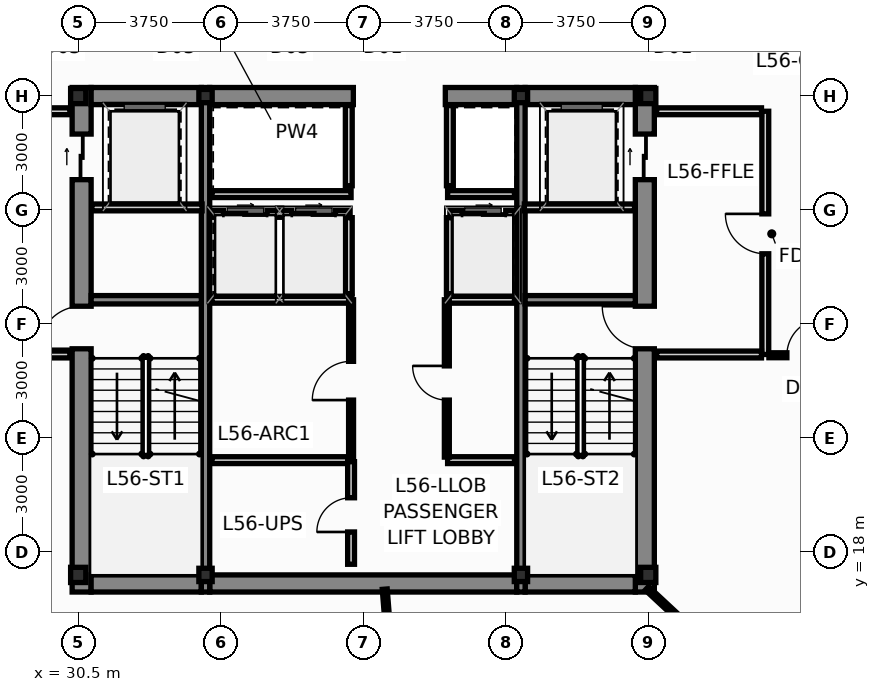
"""IFC4 building model, lengths in metres.
Left out: names, types, materials, properties, quantities, classifications, styles, units other than length and angle.
Written with IfcOpenShell. Run it as: python <this file> out.ifc"""

import sys

from ifc_helpers import new_model, si_unit, direction, frame, frame_2d, origin, origin_2d, place, context, subcontext, project, spatial, rectangle, hollow_rectangle, i_section, extrude, source, transform, mapped, element, fill, save


model = new_model("IFC4")
c1 = context("Model", 3, precision=1e-05, world=origin(), true_north=direction((0.0, 1.0)))
c2 = subcontext(c1, "Body", "Model", "MODEL_VIEW")
j1 = project(units=[si_unit("LENGTHUNIT", "METRE"), si_unit("PLANEANGLEUNIT", "RADIAN")], contexts=[c1])
p1 = place(None, origin())
s1 = spatial("IfcSite", under=j1, at=p1, CompositionType="ELEMENT")
p2 = place(p1, origin())
s2 = spatial("IfcBuilding", under=s1, at=p2, CompositionType="ELEMENT")
p3 = place(p2, frame((0.0, 0.0, 213.25)))
s3 = spatial("IfcBuildingStorey", under=s2, at=p3, CompositionType="ELEMENT", Elevation=213.25)
m1 = source(origin(), c2, "Body", "SweptSolid", [
    extrude(i_section(OverallWidth=0.4, OverallDepth=0.4, WebThickness=0.02, FlangeThickness=0.032, at=origin_2d()), origin(), (0.0, 0.0, 1.0), 3.65),
])
for number, where, z_axis, x_axis in (
    (1, (30.5, 17.4, 0.0), (0.0, 0.0, 1.0), (1.0, 0.0, 0.0)),
    (2, (45.5, 17.4, 0.0), (0.0, 0.0, 1.0), (1.0, 0.0, 0.0)),
    (3, (45.5, 30.0, 0.0), (0.0, 0.0, 1.0), (1.0, 0.0, 0.0)),
    (4, (30.5, 30.0, 0.0), (0.0, 0.0, 1.0), (1.0, 0.0, 0.0)),
):
    element("IfcColumn", number, at=place(p3, frame(where, z_axis=z_axis, x_axis=x_axis)), inside=s3, PredefinedType="COLUMN", context=c2, shape_type="MappedRepresentation", body=[
        mapped(m1, transform((0.0, 0.0, 0.0), scale=1.0)),
    ])
m2 = source(origin(), c2, "Body", "SweptSolid", [
    extrude(hollow_rectangle(XDim=0.35, YDim=0.35, WallThickness=0.016, at=origin_2d()), origin(), (0.0, 0.0, 1.0), 3.65),
])
for number, where, z_axis, x_axis in (
    (5, (33.85, 17.4, 0.0), (0.0, 0.0, 1.0), (1.0, 0.0, 0.0)),
    (6, (42.15, 17.4, 0.0), (0.0, 0.0, 1.0), (1.0, 0.0, 0.0)),
    (7, (33.85, 30.0, 0.0), (0.0, 0.0, 1.0), (1.0, 0.0, 0.0)),
    (8, (42.15, 30.0, 0.0), (0.0, 0.0, 1.0), (1.0, 0.0, 0.0)),
):
    element("IfcColumn", number, at=place(p3, frame(where, z_axis=z_axis, x_axis=x_axis)), inside=s3, PredefinedType="COLUMN", context=c2, shape_type="MappedRepresentation", body=[
        mapped(m2, transform((0.0, 0.0, 0.0), scale=1.0)),
    ])
p4 = place(p3, frame((30.59, 16.95, 0.0), z_axis=(0.0, 0.0, 1.0), x_axis=(0.0, 1.0, 0.0)))
e9 = element("IfcWall", 9, at=p4, inside=s3, PredefinedType="SHEAR", context=c2, shape_type="SweptSolid", body=[
    extrude(rectangle(XDim=13.275, YDim=0.5, at=frame_2d((6.638, 0.0))), origin(), (0.0, 0.0, 1.0), 3.65),
])
p5 = place(p4, frame((6.4, 0.0, 0.0)))
e10 = element("IfcOpeningElement", 10, at=p5, cuts=e9, PredefinedType="OPENING", context=c2, shape_type="SweptSolid", body=[
    extrude(rectangle(XDim=1.12, YDim=2.15, at=frame_2d((0.56, 1.075))), frame((0.0, 0.262, 0.0), z_axis=(0.0, -1.0, 0.0), x_axis=(1.0, 0.0, 0.0)), (0.0, 0.0, 1.0), 0.524),
])
p6 = place(p4, frame((10.85, 0.0, 0.0)))
e11 = element("IfcOpeningElement", 11, at=p6, cuts=e9, PredefinedType="OPENING", context=c2, shape_type="SweptSolid", body=[
    extrude(rectangle(XDim=1.2, YDim=2.2, at=frame_2d((0.6, 1.1))), frame((0.0, 0.262, 0.0), z_axis=(0.0, -1.0, 0.0), x_axis=(1.0, 0.0, 0.0)), (0.0, 0.0, 1.0), 0.524),
])
p7 = place(p3, frame((45.41, 16.95, 0.0), z_axis=(0.0, 0.0, 1.0), x_axis=(0.0, 1.0, 0.0)))
e12 = element("IfcWall", 12, at=p7, inside=s3, PredefinedType="SHEAR", context=c2, shape_type="SweptSolid", body=[
    extrude(rectangle(XDim=13.275, YDim=0.5, at=frame_2d((6.638, 0.0))), origin(), (0.0, 0.0, 1.0), 3.65),
])
p8 = place(p7, frame((6.4, 0.0, 0.0)))
e13 = element("IfcOpeningElement", 13, at=p8, cuts=e12, PredefinedType="OPENING", context=c2, shape_type="SweptSolid", body=[
    extrude(rectangle(XDim=1.12, YDim=2.15, at=frame_2d((0.56, 1.075))), frame((0.0, 0.262, 0.0), z_axis=(0.0, -1.0, 0.0), x_axis=(1.0, 0.0, 0.0)), (0.0, 0.0, 1.0), 0.524),
])
p9 = place(p7, frame((10.85, 0.0, 0.0)))
e14 = element("IfcOpeningElement", 14, at=p9, cuts=e12, PredefinedType="OPENING", context=c2, shape_type="SweptSolid", body=[
    extrude(rectangle(XDim=1.2, YDim=2.2, at=frame_2d((0.6, 1.1))), frame((0.0, 0.262, 0.0), z_axis=(0.0, -1.0, 0.0), x_axis=(1.0, 0.0, 0.0)), (0.0, 0.0, 1.0), 0.524),
])
p10 = place(p3, frame((30.84, 17.175, 0.0), z_axis=(0.0, 0.0, 1.0), x_axis=(1.0, 0.0, 0.0)))
e15 = element("IfcWall", 15, at=p10, inside=s3, PredefinedType="SHEAR", context=c2, shape_type="SweptSolid", body=[
    extrude(rectangle(XDim=2.9, YDim=0.45, at=frame_2d((1.45, 0.0))), origin(), (0.0, 0.0, 1.0), 3.65),
])
p11 = place(p3, frame((33.96, 17.175, 0.0), z_axis=(0.0, 0.0, 1.0), x_axis=(1.0, 0.0, 0.0)))
e16 = element("IfcWall", 16, at=p11, inside=s3, PredefinedType="SHEAR", context=c2, shape_type="SweptSolid", body=[
    extrude(rectangle(XDim=8.08, YDim=0.45, at=frame_2d((4.04, 0.0))), origin(), (0.0, 0.0, 1.0), 3.65),
])
for number, where, z_axis, x_axis in (
    (17, (42.26, 17.175, 0.0), (0.0, 0.0, 1.0), (1.0, 0.0, 0.0)),
    (18, (30.84, 30.0, 0.0), (0.0, 0.0, 1.0), (1.0, 0.0, 0.0)),
):
    element("IfcWall", number, at=place(p3, frame(where, z_axis=z_axis, x_axis=x_axis)), inside=s3, PredefinedType="SHEAR", context=c2, shape_type="SweptSolid", body=[
        extrude(rectangle(XDim=2.9, YDim=0.45, at=frame_2d((1.45, 0.0))), origin(), (0.0, 0.0, 1.0), 3.65),
    ])
p12 = place(p3, frame((33.96, 30.0, 0.0), z_axis=(0.0, 0.0, 1.0), x_axis=(1.0, 0.0, 0.0)))
e19 = element("IfcWall", 19, at=p12, inside=s3, PredefinedType="SHEAR", context=c2, shape_type="SweptSolid", body=[
    extrude(rectangle(XDim=3.78, YDim=0.45, at=frame_2d((1.89, 0.0))), origin(), (0.0, 0.0, 1.0), 3.65),
])
p13 = place(p3, frame((40.16, 30.0, 0.0), z_axis=(0.0, 0.0, 1.0), x_axis=(1.0, 0.0, 0.0)))
e20 = element("IfcWall", 20, at=p13, inside=s3, PredefinedType="SHEAR", context=c2, shape_type="SweptSolid", body=[
    extrude(rectangle(XDim=1.88, YDim=0.45, at=frame_2d((0.94, 0.0))), origin(), (0.0, 0.0, 1.0), 3.65),
])
p14 = place(p3, frame((42.26, 30.0, 0.0), z_axis=(0.0, 0.0, 1.0), x_axis=(1.0, 0.0, 0.0)))
e21 = element("IfcWall", 21, at=p14, inside=s3, PredefinedType="SHEAR", context=c2, shape_type="SweptSolid", body=[
    extrude(rectangle(XDim=2.9, YDim=0.45, at=frame_2d((1.45, 0.0))), origin(), (0.0, 0.0, 1.0), 3.65),
])
for number, where, z_axis, x_axis in (
    (22, (33.85, 16.95, 0.0), (0.0, 0.0, 1.0), (0.0, 1.0, 0.0)),
    (23, (42.15, 16.95, 0.0), (0.0, 0.0, 1.0), (0.0, 1.0, 0.0)),
):
    element("IfcWall", number, at=place(p3, frame(where, z_axis=z_axis, x_axis=x_axis)), inside=s3, PredefinedType="SHEAR", context=c2, shape_type="SweptSolid", body=[
        extrude(rectangle(XDim=13.275, YDim=0.22, at=frame_2d((6.638, 0.0))), origin(), (0.0, 0.0, 1.0), 3.65),
    ])
for number, where, z_axis, x_axis in (
    (24, (30.84, 24.64, 0.0), (0.0, 0.0, 1.0), (1.0, 0.0, 0.0)),
    (25, (42.26, 24.64, 0.0), (0.0, 0.0, 1.0), (1.0, 0.0, 0.0)),
):
    element("IfcWall", number, at=place(p3, frame(where, z_axis=z_axis, x_axis=x_axis)), inside=s3, PredefinedType="SHEAR", context=c2, shape_type="SweptSolid", body=[
        extrude(rectangle(XDim=2.9, YDim=0.22, at=frame_2d((1.45, 0.0))), origin(), (0.0, 0.0, 1.0), 3.65),
    ])
p15 = place(p3, frame((34.02, 26.9, 0.0), z_axis=(0.0, 0.0, 1.0), x_axis=(1.0, 0.0, 0.0)))
e26 = element("IfcWall", 26, at=p15, inside=s3, PredefinedType="PARTITIONING", context=c2, shape_type="SweptSolid", body=[
    extrude(rectangle(XDim=3.6, YDim=0.18, at=frame_2d((1.8, 0.0))), origin(), (0.0, 0.0, 1.0), 3.4),
])
p16 = place(p15, frame((0.3, 0.0, 0.0)))
e27 = element("IfcOpeningElement", 27, at=p16, cuts=e26, PredefinedType="OPENING", context=c2, shape_type="SweptSolid", body=[
    extrude(rectangle(XDim=1.15, YDim=2.2, at=frame_2d((0.575, 1.1))), frame((0.0, 0.102, 0.0), z_axis=(0.0, -1.0, 0.0), x_axis=(1.0, 0.0, 0.0)), (0.0, 0.0, 1.0), 0.204),
])
p17 = place(p15, frame((2.1, 0.0, 0.0)))
e28 = element("IfcOpeningElement", 28, at=p17, cuts=e26, PredefinedType="OPENING", context=c2, shape_type="SweptSolid", body=[
    extrude(rectangle(XDim=1.15, YDim=2.2, at=frame_2d((0.575, 1.1))), frame((0.0, 0.102, 0.0), z_axis=(0.0, -1.0, 0.0), x_axis=(1.0, 0.0, 0.0)), (0.0, 0.0, 1.0), 0.204),
])
p18 = place(p3, frame((40.28, 26.9, 0.0), z_axis=(0.0, 0.0, 1.0), x_axis=(1.0, 0.0, 0.0)))
e29 = element("IfcWall", 29, at=p18, inside=s3, PredefinedType="PARTITIONING", context=c2, shape_type="SweptSolid", body=[
    extrude(rectangle(XDim=1.7, YDim=0.18, at=frame_2d((0.85, 0.0))), origin(), (0.0, 0.0, 1.0), 3.4),
])
p19 = place(p18, frame((0.32, 0.0, 0.0)))
e30 = element("IfcOpeningElement", 30, at=p19, cuts=e29, PredefinedType="OPENING", context=c2, shape_type="SweptSolid", body=[
    extrude(rectangle(XDim=1.15, YDim=2.2, at=frame_2d((0.575, 1.1))), frame((0.0, 0.102, 0.0), z_axis=(0.0, -1.0, 0.0), x_axis=(1.0, 0.0, 0.0)), (0.0, 0.0, 1.0), 0.204),
])
for number, where, z_axis, x_axis in (
    (31, (37.62, 24.8, 0.0), (0.0, 0.0, 1.0), (0.0, 1.0, 0.0)),
    (32, (40.28, 24.8, 0.0), (0.0, 0.0, 1.0), (0.0, 1.0, 0.0)),
):
    element("IfcWall", number, at=place(p3, frame(where, z_axis=z_axis, x_axis=x_axis)), inside=s3, PredefinedType="PARTITIONING", context=c2, shape_type="SweptSolid", body=[
        extrude(rectangle(XDim=2.0, YDim=0.18, at=frame_2d((1.0, 0.0))), origin(), (0.0, 0.0, 1.0), 3.4),
    ])
p20 = place(p3, frame((34.02, 24.64, 0.0), z_axis=(0.0, 0.0, 1.0), x_axis=(1.0, 0.0, 0.0)))
e33 = element("IfcWall", 33, at=p20, inside=s3, PredefinedType="PARTITIONING", context=c2, shape_type="SweptSolid", body=[
    extrude(rectangle(XDim=3.68, YDim=0.18, at=frame_2d((1.84, 0.0))), origin(), (0.0, 0.0, 1.0), 3.4),
])
p21 = place(p3, frame((40.2, 24.64, 0.0), z_axis=(0.0, 0.0, 1.0), x_axis=(1.0, 0.0, 0.0)))
e34 = element("IfcWall", 34, at=p21, inside=s3, PredefinedType="PARTITIONING", context=c2, shape_type="SweptSolid", body=[
    extrude(rectangle(XDim=1.78, YDim=0.18, at=frame_2d((0.89, 0.0))), origin(), (0.0, 0.0, 1.0), 3.4),
])
p22 = place(p3, frame((34.02, 27.42, 0.0), z_axis=(0.0, 0.0, 1.0), x_axis=(1.0, 0.0, 0.0)))
e35 = element("IfcWall", 35, at=p22, inside=s3, PredefinedType="PARTITIONING", context=c2, shape_type="SweptSolid", body=[
    extrude(rectangle(XDim=3.66, YDim=0.18, at=frame_2d((1.83, 0.0))), origin(), (0.0, 0.0, 1.0), 3.4),
])
p23 = place(p3, frame((40.22, 27.42, 0.0), z_axis=(0.0, 0.0, 1.0), x_axis=(1.0, 0.0, 0.0)))
e36 = element("IfcWall", 36, at=p23, inside=s3, PredefinedType="PARTITIONING", context=c2, shape_type="SweptSolid", body=[
    extrude(rectangle(XDim=1.76, YDim=0.18, at=frame_2d((0.88, 0.0))), origin(), (0.0, 0.0, 1.0), 3.4),
])
for number, where, z_axis, x_axis in (
    (37, (37.62, 27.64, 0.0), (0.0, 0.0, 1.0), (0.0, 1.0, 0.0)),
    (38, (40.28, 27.64, 0.0), (0.0, 0.0, 1.0), (0.0, 1.0, 0.0)),
):
    element("IfcWall", number, at=place(p3, frame(where, z_axis=z_axis, x_axis=x_axis)), inside=s3, PredefinedType="PARTITIONING", context=c2, shape_type="SweptSolid", body=[
        extrude(rectangle(XDim=2.11, YDim=0.18, at=frame_2d((1.055, 0.0))), origin(), (0.0, 0.0, 1.0), 3.4),
    ])
p24 = place(p3, frame((27.52, 23.2, 0.0), z_axis=(0.0, 0.0, 1.0), x_axis=(1.0, 0.0, 0.0)))
e39 = element("IfcWall", 39, at=p24, inside=s3, PredefinedType="PARTITIONING", context=c2, shape_type="SweptSolid", body=[
    extrude(rectangle(XDim=2.76, YDim=0.18, at=frame_2d((1.38, 0.0))), origin(), (0.0, 0.0, 1.0), 3.4),
])
p25 = place(p3, frame((27.52, 29.6, 0.0), z_axis=(0.0, 0.0, 1.0), x_axis=(1.0, 0.0, 0.0)))
e40 = element("IfcWall", 40, at=p25, inside=s3, PredefinedType="PARTITIONING", context=c2, shape_type="SweptSolid", body=[
    extrude(rectangle(XDim=2.76, YDim=0.18, at=frame_2d((1.38, 0.0))), origin(), (0.0, 0.0, 1.0), 2.925),
])
p26 = place(p3, frame((48.58, 23.2, 0.0), z_axis=(0.0, 0.0, 1.0), x_axis=(0.0, 1.0, 0.0)))
e41 = element("IfcWall", 41, at=p26, inside=s3, PredefinedType="PARTITIONING", context=c2, shape_type="SweptSolid", body=[
    extrude(rectangle(XDim=6.4, YDim=0.18, at=frame_2d((3.2, 0.0))), origin(), (0.0, 0.0, 1.0), 3.078),
])
p27 = place(p26, frame((2.65, 0.0, 0.0)))
e42 = element("IfcOpeningElement", 42, at=p27, cuts=e41, PredefinedType="OPENING", context=c2, shape_type="SweptSolid", body=[
    extrude(rectangle(XDim=1.05, YDim=2.15, at=frame_2d((0.525, 1.075))), frame((0.0, 0.102, 0.0), z_axis=(0.0, -1.0, 0.0), x_axis=(1.0, 0.0, 0.0)), (0.0, 0.0, 1.0), 0.204),
])
p28 = place(p3, frame((45.72, 23.2, 0.0), z_axis=(0.0, 0.0, 1.0), x_axis=(1.0, 0.0, 0.0)))
e43 = element("IfcWall", 43, at=p28, inside=s3, PredefinedType="PARTITIONING", context=c2, shape_type="SweptSolid", body=[
    extrude(rectangle(XDim=2.76, YDim=0.18, at=frame_2d((1.38, 0.0))), origin(), (0.0, 0.0, 1.0), 3.4),
])
p29 = place(p3, frame((45.72, 29.6, 0.0), z_axis=(0.0, 0.0, 1.0), x_axis=(1.0, 0.0, 0.0)))
e44 = element("IfcWall", 44, at=p29, inside=s3, PredefinedType="PARTITIONING", context=c2, shape_type="SweptSolid", body=[
    extrude(rectangle(XDim=2.76, YDim=0.18, at=frame_2d((1.38, 0.0))), origin(), (0.0, 0.0, 1.0), 2.925),
])
for number, where, z_axis, x_axis in (
    (45, (30.86, 27.07, 0.0), (0.0, 0.0, 1.0), (1.0, 0.0, 0.0)),
    (46, (42.24, 27.07, 0.0), (0.0, 0.0, 1.0), (1.0, 0.0, 0.0)),
):
    element("IfcWall", number, at=place(p3, frame(where, z_axis=z_axis, x_axis=x_axis)), inside=s3, PredefinedType="PARTITIONING", context=c2, shape_type="SweptSolid", body=[
        extrude(rectangle(XDim=2.9, YDim=0.18, at=frame_2d((1.45, 0.0))), origin(), (0.0, 0.0, 1.0), 3.4),
    ])
p30 = place(p3, frame((34.02, 20.42, 0.0), z_axis=(0.0, 0.0, 1.0), x_axis=(1.0, 0.0, 0.0)))
e47 = element("IfcWall", 47, at=p30, inside=s3, PredefinedType="PARTITIONING", context=c2, shape_type="SweptSolid", body=[
    extrude(rectangle(XDim=3.64, YDim=0.18, at=frame_2d((1.82, 0.0))), origin(), (0.0, 0.0, 1.0), 3.4),
])
p31 = place(p3, frame((40.22, 20.42, 0.0), z_axis=(0.0, 0.0, 1.0), x_axis=(1.0, 0.0, 0.0)))
e48 = element("IfcWall", 48, at=p31, inside=s3, PredefinedType="PARTITIONING", context=c2, shape_type="SweptSolid", body=[
    extrude(rectangle(XDim=1.76, YDim=0.18, at=frame_2d((0.88, 0.0))), origin(), (0.0, 0.0, 1.0), 3.4),
])
p32 = place(p3, frame((37.68, 20.5, 0.0), z_axis=(0.0, 0.0, 1.0), x_axis=(0.0, 1.0, 0.0)))
e49 = element("IfcWall", 49, at=p32, inside=s3, PredefinedType="PARTITIONING", context=c2, shape_type="SweptSolid", body=[
    extrude(rectangle(XDim=4.14, YDim=0.13, at=frame_2d((2.07, 0.0))), origin(), (0.0, 0.0, 1.0), 3.4),
])
p33 = place(p32, frame((1.5, 0.0, 0.0)))
e50 = element("IfcOpeningElement", 50, at=p33, cuts=e49, PredefinedType="OPENING", context=c2, shape_type="SweptSolid", body=[
    extrude(rectangle(XDim=1.02, YDim=2.15, at=frame_2d((0.51, 1.075))), frame((0.0, 0.077, 0.0), z_axis=(0.0, -1.0, 0.0), x_axis=(1.0, 0.0, 0.0)), (0.0, 0.0, 1.0), 0.154),
])
p34 = place(p3, frame((40.2, 20.5, 0.0), z_axis=(0.0, 0.0, 1.0), x_axis=(0.0, 1.0, 0.0)))
e51 = element("IfcWall", 51, at=p34, inside=s3, PredefinedType="PARTITIONING", context=c2, shape_type="SweptSolid", body=[
    extrude(rectangle(XDim=4.14, YDim=0.13, at=frame_2d((2.07, 0.0))), origin(), (0.0, 0.0, 1.0), 3.4),
])
p35 = place(p34, frame((1.5, 0.0, 0.0)))
e52 = element("IfcOpeningElement", 52, at=p35, cuts=e51, PredefinedType="OPENING", context=c2, shape_type="SweptSolid", body=[
    extrude(rectangle(XDim=0.9, YDim=2.1, at=frame_2d((0.45, 1.05))), frame((0.0, 0.077, 0.0), z_axis=(0.0, -1.0, 0.0), x_axis=(1.0, 0.0, 0.0)), (0.0, 0.0, 1.0), 0.154),
])
p36 = place(p3, frame((37.68, 17.68, 0.0), z_axis=(0.0, 0.0, 1.0), x_axis=(0.0, 1.0, 0.0)))
e53 = element("IfcWall", 53, at=p36, inside=s3, PredefinedType="PARTITIONING", context=c2, shape_type="SweptSolid", body=[
    extrude(rectangle(XDim=2.7, YDim=0.18, at=frame_2d((1.35, 0.0))), origin(), (0.0, 0.0, 1.0), 3.4),
])
p37 = place(p36, frame((0.85, 0.0, 0.0)))
e54 = element("IfcOpeningElement", 54, at=p37, cuts=e53, PredefinedType="OPENING", context=c2, shape_type="SweptSolid", body=[
    extrude(rectangle(XDim=0.9, YDim=2.1, at=frame_2d((0.45, 1.05))), frame((0.0, 0.102, 0.0), z_axis=(0.0, -1.0, 0.0), x_axis=(1.0, 0.0, 0.0)), (0.0, 0.0, 1.0), 0.204),
])
p38 = place(p3, frame((45.465, 17.049, 0.0), z_axis=(0.0, 0.0, 1.0), x_axis=(0.731756869625, -0.681565758938, 0.0)))
e55 = element("IfcWall", 55, at=p38, inside=s3, PredefinedType="PARTITIONING", context=c2, shape_type="SweptSolid", body=[
    extrude(rectangle(XDim=8.269, YDim=0.13, at=frame_2d((4.135, 0.0))), origin(), (0.0, 0.0, 1.0), 2.925),
])
p39 = place(p3, frame((38.566, 17.025, 0.0), z_axis=(0.0, 0.0, 1.0), x_axis=(0.078915791572, -0.996881285731, 0.0)))
e56 = element("IfcWall", 56, at=p39, inside=s3, PredefinedType="PARTITIONING", context=c2, shape_type="SweptSolid", body=[
    extrude(rectangle(XDim=5.627, YDim=0.13, at=frame_2d((2.814, 0.0))), origin(), (0.0, 0.0, 1.0), 3.4),
])
p40 = place(p3, frame((48.675, 23.18, 0.0), z_axis=(0.0, 0.0, 1.0), x_axis=(1.0, 0.0, 0.0)))
e57 = element("IfcWall", 57, at=p40, inside=s3, PredefinedType="PARTITIONING", context=c2, shape_type="SweptSolid", body=[
    extrude(rectangle(XDim=1.905, YDim=0.13, at=frame_2d((0.953, 0.0))), origin(), (0.0, 0.0, 1.0), 3.4),
])
p41 = place(p40, frame((0.473, 0.0, 0.0)))
e58 = element("IfcOpeningElement", 58, at=p41, cuts=e57, PredefinedType="OPENING", context=c2, shape_type="SweptSolid", body=[
    extrude(rectangle(XDim=0.96, YDim=2.15, at=frame_2d((0.48, 1.075))), frame((0.0, 0.077, 0.0), z_axis=(0.0, -1.0, 0.0), x_axis=(1.0, 0.0, 0.0)), (0.0, 0.0, 1.0), 0.154),
])
p42 = place(p5, origin())
e59 = element("IfcDoor", 59, at=p42, inside=s3, OperationType="SINGLE_SWING_LEFT", PredefinedType="DOOR", context=c2, shape_type="SweptSolid", body=[
    extrude(rectangle(XDim=1.12, YDim=2.15, at=frame_2d((0.56, 1.075))), frame((0.0, 0.025, 0.0), z_axis=(0.0, -1.0, 0.0), x_axis=(1.0, 0.0, 0.0)), (0.0, 0.0, 1.0), 0.05),
])
fill(e10, e59)
p43 = place(p6, origin())
e60 = element("IfcDoor", 60, at=p43, inside=s3, OperationType="SLIDING_TO_LEFT", PredefinedType="DOOR", context=c2, shape_type="SweptSolid", body=[
    extrude(rectangle(XDim=1.2, YDim=2.2, at=frame_2d((0.6, 1.1))), frame((0.0, 0.025, 0.0), z_axis=(0.0, -1.0, 0.0), x_axis=(1.0, 0.0, 0.0)), (0.0, 0.0, 1.0), 0.05),
])
fill(e11, e60)
p44 = place(p8, origin())
e61 = element("IfcDoor", 61, at=p44, inside=s3, OperationType="SINGLE_SWING_RIGHT", PredefinedType="DOOR", context=c2, shape_type="SweptSolid", body=[
    extrude(rectangle(XDim=1.12, YDim=2.15, at=frame_2d((0.56, 1.075))), frame((0.0, 0.025, 0.0), z_axis=(0.0, -1.0, 0.0), x_axis=(1.0, 0.0, 0.0)), (0.0, 0.0, 1.0), 0.05),
])
fill(e13, e61)
p45 = place(p9, origin())
e62 = element("IfcDoor", 62, at=p45, inside=s3, OperationType="SLIDING_TO_RIGHT", PredefinedType="DOOR", context=c2, shape_type="SweptSolid", body=[
    extrude(rectangle(XDim=1.2, YDim=2.2, at=frame_2d((0.6, 1.1))), frame((0.0, 0.025, 0.0), z_axis=(0.0, -1.0, 0.0), x_axis=(1.0, 0.0, 0.0)), (0.0, 0.0, 1.0), 0.05),
])
fill(e14, e62)
p46 = place(p16, origin())
e63 = element("IfcDoor", 63, at=p46, inside=s3, OperationType="SLIDING_TO_LEFT", PredefinedType="DOOR", context=c2, shape_type="SweptSolid", body=[
    extrude(rectangle(XDim=1.15, YDim=2.2, at=frame_2d((0.575, 1.1))), frame((0.0, 0.025, 0.0), z_axis=(0.0, -1.0, 0.0), x_axis=(1.0, 0.0, 0.0)), (0.0, 0.0, 1.0), 0.05),
])
fill(e27, e63)
p47 = place(p17, origin())
e64 = element("IfcDoor", 64, at=p47, inside=s3, OperationType="SLIDING_TO_RIGHT", PredefinedType="DOOR", context=c2, shape_type="SweptSolid", body=[
    extrude(rectangle(XDim=1.15, YDim=2.2, at=frame_2d((0.575, 1.1))), frame((0.0, 0.025, 0.0), z_axis=(0.0, -1.0, 0.0), x_axis=(1.0, 0.0, 0.0)), (0.0, 0.0, 1.0), 0.05),
])
fill(e28, e64)
p48 = place(p19, origin())
e65 = element("IfcDoor", 65, at=p48, inside=s3, OperationType="SLIDING_TO_LEFT", PredefinedType="DOOR", context=c2, shape_type="SweptSolid", body=[
    extrude(rectangle(XDim=1.15, YDim=2.2, at=frame_2d((0.575, 1.1))), frame((0.0, 0.025, 0.0), z_axis=(0.0, -1.0, 0.0), x_axis=(1.0, 0.0, 0.0)), (0.0, 0.0, 1.0), 0.05),
])
fill(e30, e65)
p49 = place(p27, origin())
e66 = element("IfcDoor", 66, at=p49, inside=s3, OperationType="SINGLE_SWING_RIGHT", PredefinedType="DOOR", context=c2, shape_type="SweptSolid", body=[
    extrude(rectangle(XDim=1.05, YDim=2.15, at=frame_2d((0.525, 1.075))), frame((0.0, 0.025, 0.0), z_axis=(0.0, -1.0, 0.0), x_axis=(1.0, 0.0, 0.0)), (0.0, 0.0, 1.0), 0.05),
])
fill(e42, e66)
p50 = place(p33, origin())
e67 = element("IfcDoor", 67, at=p50, inside=s3, OperationType="SINGLE_SWING_LEFT", PredefinedType="DOOR", context=c2, shape_type="SweptSolid", body=[
    extrude(rectangle(XDim=1.02, YDim=2.15, at=frame_2d((0.51, 1.075))), frame((0.0, 0.025, 0.0), z_axis=(0.0, -1.0, 0.0), x_axis=(1.0, 0.0, 0.0)), (0.0, 0.0, 1.0), 0.05),
])
fill(e50, e67)
p51 = place(p35, origin())
e68 = element("IfcDoor", 68, at=p51, inside=s3, OperationType="SINGLE_SWING_RIGHT", PredefinedType="DOOR", context=c2, shape_type="SweptSolid", body=[
    extrude(rectangle(XDim=0.9, YDim=2.1, at=frame_2d((0.45, 1.05))), frame((0.0, 0.025, 0.0), z_axis=(0.0, -1.0, 0.0), x_axis=(1.0, 0.0, 0.0)), (0.0, 0.0, 1.0), 0.05),
])
fill(e52, e68)
p52 = place(p37, origin())
e69 = element("IfcDoor", 69, at=p52, inside=s3, OperationType="SINGLE_SWING_LEFT", PredefinedType="DOOR", context=c2, shape_type="SweptSolid", body=[
    extrude(rectangle(XDim=0.9, YDim=2.1, at=frame_2d((0.45, 1.05))), frame((0.0, 0.025, 0.0), z_axis=(0.0, -1.0, 0.0), x_axis=(1.0, 0.0, 0.0)), (0.0, 0.0, 1.0), 0.05),
])
fill(e54, e69)
p53 = place(p41, origin())
e70 = element("IfcDoor", 70, at=p53, inside=s3, OperationType="SINGLE_SWING_RIGHT", PredefinedType="DOOR", context=c2, shape_type="SweptSolid", body=[
    extrude(rectangle(XDim=0.96, YDim=2.15, at=frame_2d((0.48, 1.075))), frame((0.0, 0.025, 0.0), z_axis=(0.0, -1.0, 0.0), x_axis=(1.0, 0.0, 0.0)), (0.0, 0.0, 1.0), 0.05),
])
fill(e58, e70)
save(model, sys.argv[1])
